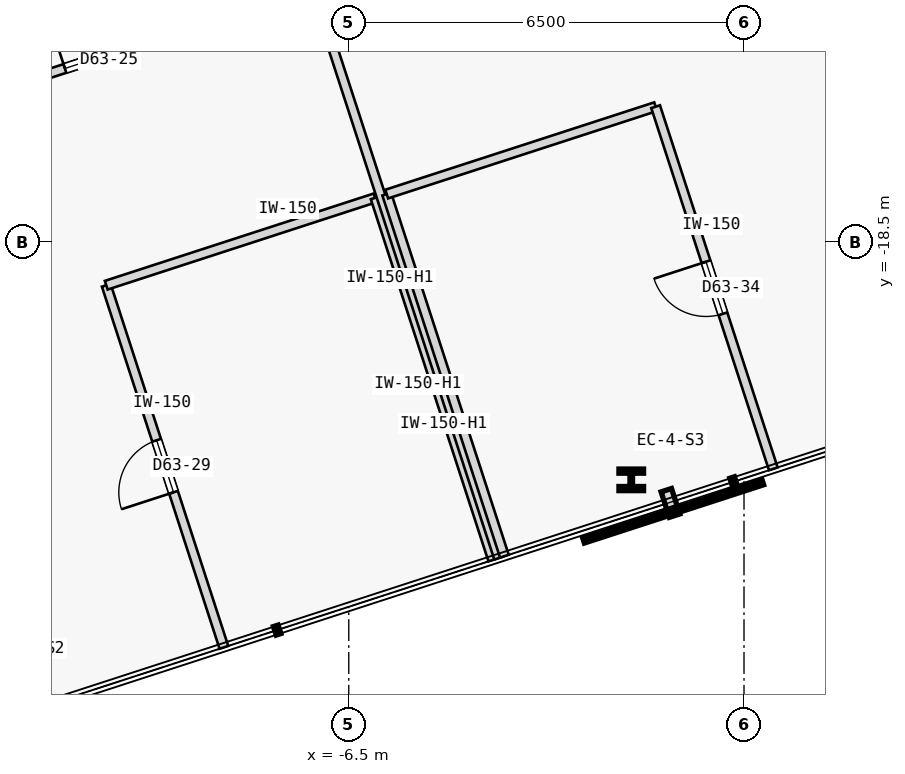
"""IFC4 building model, lengths in metres.
Left out: names, types, materials, properties, quantities, classifications, styles, units other than length and angle.
Written with IfcOpenShell. Run it as: python <this file> out.ifc"""

import sys

from ifc_helpers import new_model, si_unit, direction, frame, frame_2d, origin, origin_2d, place, context, subcontext, project, spatial, rectangle, i_section, extrude, element, fill, save


model = new_model("IFC4")
c1 = context("Model", 3, precision=1e-05, world=origin(), true_north=direction((0.0, 1.0)))
c2 = subcontext(c1, "Body", "Model", "MODEL_VIEW")
j1 = project(units=[si_unit("LENGTHUNIT", "METRE"), si_unit("PLANEANGLEUNIT", "RADIAN")], contexts=[c1])
p1 = place(None, origin())
s1 = spatial("IfcSite", under=j1, at=p1, CompositionType="ELEMENT")
p2 = place(p1, origin())
s2 = spatial("IfcBuilding", under=s1, at=p2, CompositionType="ELEMENT")
p3 = place(p2, frame((0.0, 0.0, 237.7)))
s3 = spatial("IfcBuildingStorey", under=s2, at=p3, CompositionType="ELEMENT", Elevation=237.7)
p4 = place(p3, frame((-1.854, -22.409, 0.0), z_axis=(0.0, 0.0, 1.0), x_axis=(1.0, 0.0, 0.0)))
e1 = element("IfcColumn", 1, at=p4, inside=s3, PredefinedType="COLUMN", context=c2, shape_type="SweptSolid", body=[
    extrude(i_section(OverallWidth=0.405, OverallDepth=0.355, WebThickness=0.042, FlangeThickness=0.068, FilletRadius=0.015, at=origin_2d()), origin(), (0.0, 0.0, 1.0), 3.35),
])
p5 = place(p3, frame((-14.349, -16.677, 0.0), z_axis=(0.0, 0.0, 1.0), x_axis=(0.951058958043, 0.309009479345, 0.0)))
e2 = element("IfcWall", 2, at=p5, inside=s3, PredefinedType="PARTITIONING", context=c2, shape_type="SweptSolid", body=[
    extrude(rectangle(XDim=7.64, YDim=0.15, at=frame_2d((3.82, 0.0))), origin(), (0.0, 0.0, 1.0), 3.125),
])
p6 = place(p5, frame((3.345, 0.0, 0.0)))
e3 = element("IfcOpeningElement", 3, at=p6, cuts=e2, PredefinedType="OPENING", context=c2, shape_type="SweptSolid", body=[
    extrude(rectangle(XDim=0.95, YDim=2.15, at=frame_2d((0.475, 1.075))), frame((0.0, 0.085, 0.0), z_axis=(0.0, -1.0, 0.0), x_axis=(1.0, 0.0, 0.0)), (0.0, 0.0, 1.0), 0.17),
])
p7 = place(p3, frame((-8.553, -25.164, 0.0), z_axis=(0.0, 0.0, 1.0), x_axis=(-0.309013782848, 0.951057559777, 0.0)))
e4 = element("IfcWall", 4, at=p7, inside=s3, PredefinedType="PARTITIONING", context=c2, shape_type="SweptSolid", body=[
    extrude(rectangle(XDim=6.262, YDim=0.15, at=frame_2d((3.131, 0.0))), origin(), (0.0, 0.0, 1.0), 3.125),
])
p8 = place(p7, frame((2.681, 0.0, 0.0)))
e5 = element("IfcOpeningElement", 5, at=p8, cuts=e4, PredefinedType="OPENING", context=c2, shape_type="SweptSolid", body=[
    extrude(rectangle(XDim=0.9, YDim=2.15, at=frame_2d((0.45, 1.075))), frame((0.0, 0.085, 0.0), z_axis=(0.0, -1.0, 0.0), x_axis=(1.0, 0.0, 0.0)), (0.0, 0.0, 1.0), 0.17),
])
p9 = place(p3, frame((-10.488, -19.208, 0.0), z_axis=(0.0, 0.0, 1.0), x_axis=(0.951050272606, 0.309036209813, 0.0)))
e6 = element("IfcWall", 6, at=p9, inside=s3, PredefinedType="PARTITIONING", context=c2, shape_type="SweptSolid", body=[
    extrude(rectangle(XDim=4.65, YDim=0.15, at=frame_2d((2.325, 0.0))), origin(), (0.0, 0.0, 1.0), 3.125),
])
p10 = place(p3, frame((-4.131, -23.727, 0.0), z_axis=(0.0, 0.0, 1.0), x_axis=(-0.309013782848, 0.951057559777, 0.0)))
e7 = element("IfcWall", 7, at=p10, inside=s3, PredefinedType="PARTITIONING", context=c2, shape_type="SweptSolid", body=[
    extrude(rectangle(XDim=6.262, YDim=0.15, at=frame_2d((3.131, 0.0))), origin(), (0.0, 0.0, 1.0), 2.675),
])
p11 = place(p3, frame((-4.036, -23.696, 0.0), z_axis=(0.0, 0.0, 1.0), x_axis=(-0.309022258842, 0.95105480575, 0.0)))
e8 = element("IfcWall", 8, at=p11, inside=s3, PredefinedType="PARTITIONING", context=c2, shape_type="SweptSolid", body=[
    extrude(rectangle(XDim=9.862, YDim=0.15, at=frame_2d((4.931, 0.0))), origin(), (0.0, 0.0, 1.0), 2.675),
])
p12 = place(p3, frame((-3.941, -23.665, 0.0), z_axis=(0.0, 0.0, 1.0), x_axis=(-0.309013782848, 0.951057559777, 0.0)))
e9 = element("IfcWall", 9, at=p12, inside=s3, PredefinedType="PARTITIONING", context=c2, shape_type="SweptSolid", body=[
    extrude(rectangle(XDim=6.262, YDim=0.15, at=frame_2d((3.131, 0.0))), origin(), (0.0, 0.0, 1.0), 2.675),
])
p13 = place(p3, frame((-5.876, -17.709, 0.0), z_axis=(0.0, 0.0, 1.0), x_axis=(0.951065702951, 0.308988719326, 0.0)))
e10 = element("IfcWall", 10, at=p13, inside=s3, PredefinedType="PARTITIONING", context=c2, shape_type="SweptSolid", body=[
    extrude(rectangle(XDim=4.65, YDim=0.15, at=frame_2d((2.325, 0.0))), origin(), (0.0, 0.0, 1.0), 3.125),
])
p14 = place(p3, frame((0.482, -22.228, 0.0), z_axis=(0.0, 0.0, 1.0), x_axis=(-0.30902524124, 0.951053836687, 0.0)))
e11 = element("IfcWall", 11, at=p14, inside=s3, PredefinedType="PARTITIONING", context=c2, shape_type="SweptSolid", body=[
    extrude(rectangle(XDim=6.262, YDim=0.15, at=frame_2d((3.131, 0.0))), origin(), (0.0, 0.0, 1.0), 3.125),
])
p15 = place(p14, frame((2.681, 0.0, 0.0)))
e12 = element("IfcOpeningElement", 12, at=p15, cuts=e11, PredefinedType="OPENING", context=c2, shape_type="SweptSolid", body=[
    extrude(rectangle(XDim=0.9, YDim=2.15, at=frame_2d((0.45, 1.075))), frame((0.0, 0.085, 0.0), z_axis=(0.0, -1.0, 0.0), x_axis=(1.0, 0.0, 0.0)), (0.0, 0.0, 1.0), 0.17),
])
p16 = place(p6, origin())
e13 = element("IfcDoor", 13, at=p16, inside=s3, OperationType="SINGLE_SWING_LEFT", PredefinedType="DOOR", context=c2, shape_type="SweptSolid", body=[
    extrude(rectangle(XDim=0.95, YDim=2.15, at=frame_2d((0.475, 1.075))), frame((0.0, 0.025, 0.0), z_axis=(0.0, -1.0, 0.0), x_axis=(1.0, 0.0, 0.0)), (0.0, 0.0, 1.0), 0.05),
])
fill(e3, e13)
p17 = place(p8, origin())
e14 = element("IfcDoor", 14, at=p17, inside=s3, OperationType="SINGLE_SWING_LEFT", PredefinedType="DOOR", context=c2, shape_type="SweptSolid", body=[
    extrude(rectangle(XDim=0.9, YDim=2.15, at=frame_2d((0.45, 1.075))), frame((0.0, 0.025, 0.0), z_axis=(0.0, -1.0, 0.0), x_axis=(1.0, 0.0, 0.0)), (0.0, 0.0, 1.0), 0.05),
])
fill(e5, e14)
p18 = place(p15, origin())
e15 = element("IfcDoor", 15, at=p18, inside=s3, OperationType="SINGLE_SWING_RIGHT", PredefinedType="DOOR", context=c2, shape_type="SweptSolid", body=[
    extrude(rectangle(XDim=0.9, YDim=2.15, at=frame_2d((0.45, 1.075))), frame((0.0, 0.025, 0.0), z_axis=(0.0, -1.0, 0.0), x_axis=(1.0, 0.0, 0.0)), (0.0, 0.0, 1.0), 0.05),
])
fill(e12, e15)
save(model, sys.argv[1])
